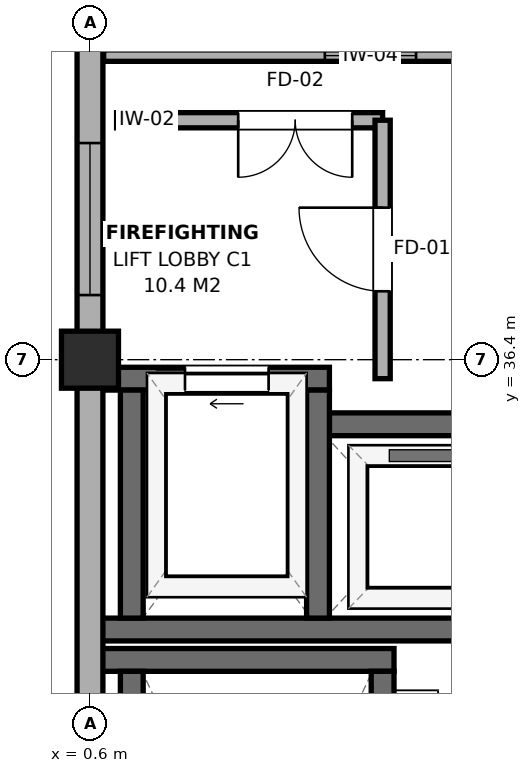
"""IFC4 building model, lengths in metres.
Left out: names, types, materials, properties, quantities, classifications, styles, units other than length and angle.
Written with IfcOpenShell. Run it as: python <this file> out.ifc"""

import sys

from ifc_helpers import new_model, si_unit, direction, frame, frame_2d, origin, origin_2d, place, context, subcontext, project, spatial, rectangle, extrude, element, fill, save


model = new_model("IFC4")
c1 = context("Model", 3, precision=1e-05, world=origin(), true_north=direction((0.0, 1.0)))
c2 = subcontext(c1, "Body", "Model", "MODEL_VIEW")
j1 = project(units=[si_unit("LENGTHUNIT", "METRE"), si_unit("PLANEANGLEUNIT", "RADIAN")], contexts=[c1])
p1 = place(None, origin())
s1 = spatial("IfcSite", under=j1, at=p1, CompositionType="ELEMENT")
p2 = place(p1, origin())
s2 = spatial("IfcBuilding", under=s1, at=p2, CompositionType="ELEMENT")
p3 = place(p2, origin())
s3 = spatial("IfcBuildingStorey", under=s2, at=p3, CompositionType="ELEMENT", Elevation=0.0)
p4 = place(p3, frame((0.6, 36.4, 0.0), z_axis=(0.0, 0.0, 1.0), x_axis=(1.0, 0.0, 0.0)))
e1 = element("IfcColumn", 1, at=p4, inside=s3, PredefinedType="COLUMN", context=c2, shape_type="SweptSolid", body=[
    extrude(rectangle(XDim=0.75, YDim=0.75, at=origin_2d()), origin(), (0.0, 0.0, 1.0), 4.8),
])
p5 = place(p3, frame((0.75, 32.45, 0.0), z_axis=(0.0, 0.0, 1.0), x_axis=(1.0, 0.0, 0.0)))
e2 = element("IfcWall", 2, at=p5, inside=s3, PredefinedType="SHEAR", context=c2, shape_type="SweptSolid", body=[
    extrude(rectangle(XDim=3.85, YDim=0.3, at=frame_2d((1.925, 0.0))), origin(), (0.0, 0.0, 1.0), 4.56),
])
p6 = place(p3, frame((1.15, 25.9, 0.0), z_axis=(0.0, 0.0, 1.0), x_axis=(0.0, 1.0, 0.0)))
e3 = element("IfcWall", 3, at=p6, inside=s3, PredefinedType="SHEAR", context=c2, shape_type="SweptSolid", body=[
    extrude(rectangle(XDim=6.4, YDim=0.3, at=frame_2d((3.2, 0.0))), origin(), (0.0, 0.0, 1.0), 4.56),
])
p7 = place(p3, frame((4.45, 25.9, 0.0), z_axis=(0.0, 0.0, 1.0), x_axis=(0.0, 1.0, 0.0)))
e4 = element("IfcWall", 4, at=p7, inside=s3, PredefinedType="SHEAR", context=c2, shape_type="SweptSolid", body=[
    extrude(rectangle(XDim=6.4, YDim=0.3, at=frame_2d((3.2, 0.0))), origin(), (0.0, 0.0, 1.0), 4.56),
])
p8 = place(p7, frame((0.17, 0.0, 0.0)))
e5 = element("IfcOpeningElement", 5, at=p8, cuts=e4, PredefinedType="OPENING", context=c2, shape_type="SweptSolid", body=[
    extrude(rectangle(XDim=1.1, YDim=2.15, at=frame_2d((0.55, 1.075))), frame((0.0, 0.165, 0.0), z_axis=(0.0, -1.0, 0.0), x_axis=(1.0, 0.0, 0.0)), (0.0, 0.0, 1.0), 0.33),
])
p9 = place(p3, frame((0.75, 32.85, 0.0), z_axis=(0.0, 0.0, 1.0), x_axis=(1.0, 0.0, 0.0)))
e6 = element("IfcWall", 6, at=p9, inside=s3, PredefinedType="SHEAR", context=c2, shape_type="SweptSolid", body=[
    extrude(rectangle(XDim=5.45, YDim=0.3, at=frame_2d((2.725, 0.0))), origin(), (0.0, 0.0, 1.0), 4.56),
])
p10 = place(p3, frame((0.75, 36.15, 0.0), z_axis=(0.0, 0.0, 1.0), x_axis=(1.0, 0.0, 0.0)))
e7 = element("IfcWall", 7, at=p10, inside=s3, PredefinedType="SHEAR", context=c2, shape_type="SweptSolid", body=[
    extrude(rectangle(XDim=3.0, YDim=0.3, at=frame_2d((1.5, 0.0))), origin(), (0.0, 0.0, 1.0), 4.56),
])
p11 = place(p10, frame((1.1, 0.0, 0.0)))
e8 = element("IfcOpeningElement", 8, at=p11, cuts=e7, PredefinedType="OPENING", context=c2, shape_type="SweptSolid", body=[
    extrude(rectangle(XDim=1.1, YDim=2.15, at=frame_2d((0.55, 1.075))), frame((0.0, 0.165, 0.0), z_axis=(0.0, -1.0, 0.0), x_axis=(1.0, 0.0, 0.0)), (0.0, 0.0, 1.0), 0.33),
])
p12 = place(p3, frame((3.75, 35.55, 0.0), z_axis=(0.0, 0.0, 1.0), x_axis=(1.0, 0.0, 0.0)))
e9 = element("IfcWall", 9, at=p12, inside=s3, PredefinedType="SHEAR", context=c2, shape_type="SweptSolid", body=[
    extrude(rectangle(XDim=2.45, YDim=0.3, at=frame_2d((1.225, 0.0))), origin(), (0.0, 0.0, 1.0), 4.56),
])
for number, where, z_axis, x_axis in (
    (10, (1.15, 33.0, 0.0), (0.0, 0.0, 1.0), (0.0, 1.0, 0.0)),
    (11, (3.6, 33.0, 0.0), (0.0, 0.0, 1.0), (0.0, 1.0, 0.0)),
):
    element("IfcWall", number, at=place(p3, frame(where, z_axis=z_axis, x_axis=x_axis)), inside=s3, PredefinedType="SHEAR", context=c2, shape_type="SweptSolid", body=[
        extrude(rectangle(XDim=3.0, YDim=0.3, at=frame_2d((1.5, 0.0))), origin(), (0.0, 0.0, 1.0), 4.56),
    ])
p13 = place(p3, frame((0.6, 30.8, 0.0), z_axis=(0.0, 0.0, 1.0), x_axis=(0.0, 1.0, 0.0)))
e12 = element("IfcWall", 12, at=p13, inside=s3, PredefinedType="SOLIDWALL", context=c2, shape_type="SweptSolid", body=[
    extrude(rectangle(XDim=5.6, YDim=0.34, at=frame_2d((2.8, 0.0))), origin(), (0.0, 0.0, 1.0), 4.055),
])
p14 = place(p3, frame((0.6, 36.4, 0.0), z_axis=(0.0, 0.0, 1.0), x_axis=(0.0, 1.0, 0.0)))
e13 = element("IfcWall", 13, at=p14, inside=s3, PredefinedType="SOLIDWALL", context=c2, shape_type="SweptSolid", body=[
    extrude(rectangle(XDim=5.6, YDim=0.34, at=frame_2d((2.8, 0.0))), origin(), (0.0, 0.0, 1.0), 4.105),
])
p15 = place(p14, frame((0.85, 0.0, 0.9)))
e14 = element("IfcOpeningElement", 14, at=p15, cuts=e13, PredefinedType="OPENING", context=c2, shape_type="SweptSolid", body=[
    extrude(rectangle(XDim=2.0, YDim=1.8, at=frame_2d((1.0, 0.9))), frame((0.0, 0.185, 0.0), z_axis=(0.0, -1.0, 0.0), x_axis=(1.0, 0.0, 0.0)), (0.0, 0.0, 1.0), 0.37),
])
p16 = place(p3, frame((0.95, 39.55, 0.0), z_axis=(0.0, 0.0, 1.0), x_axis=(1.0, 0.0, 0.0)))
e15 = element("IfcWall", 15, at=p16, inside=s3, PredefinedType="PARTITIONING", context=c2, shape_type="SweptSolid", body=[
    extrude(rectangle(XDim=3.5, YDim=0.2, at=frame_2d((1.75, 0.0))), origin(), (0.0, 0.0, 1.0), 4.555),
])
p17 = place(p16, frame((1.6, 0.0, 0.0)))
e16 = element("IfcOpeningElement", 16, at=p17, cuts=e15, PredefinedType="OPENING", context=c2, shape_type="SweptSolid", body=[
    extrude(rectangle(XDim=1.5, YDim=2.15, at=frame_2d((0.75, 1.075))), frame((0.0, 0.115, 0.0), z_axis=(0.0, -1.0, 0.0), x_axis=(1.0, 0.0, 0.0)), (0.0, 0.0, 1.0), 0.23),
])
p18 = place(p3, frame((4.45, 36.15, 0.0), z_axis=(0.0, 0.0, 1.0), x_axis=(0.0, 1.0, 0.0)))
e17 = element("IfcWall", 17, at=p18, inside=s3, PredefinedType="PARTITIONING", context=c2, shape_type="SweptSolid", body=[
    extrude(rectangle(XDim=3.4, YDim=0.2, at=frame_2d((1.7, 0.0))), origin(), (0.0, 0.0, 1.0), 4.205),
])
p19 = place(p18, frame((1.15, 0.0, 0.0)))
e18 = element("IfcOpeningElement", 18, at=p19, cuts=e17, PredefinedType="OPENING", context=c2, shape_type="SweptSolid", body=[
    extrude(rectangle(XDim=1.1, YDim=2.15, at=frame_2d((0.55, 1.075))), frame((0.0, 0.115, 0.0), z_axis=(0.0, -1.0, 0.0), x_axis=(1.0, 0.0, 0.0)), (0.0, 0.0, 1.0), 0.23),
])
p20 = place(p3, frame((0.78, 40.4, 0.0), z_axis=(0.0, 0.0, 1.0), x_axis=(1.0, 0.0, 0.0)))
e19 = element("IfcWall", 19, at=p20, inside=s3, PredefinedType="PARTITIONING", context=c2, shape_type="SweptSolid", body=[
    extrude(rectangle(XDim=7.02, YDim=0.15, at=frame_2d((3.51, 0.0))), origin(), (0.0, 0.0, 1.0), 4.105),
])
p21 = place(p20, frame((2.91, 0.0, 0.95)))
e20 = element("IfcOpeningElement", 20, at=p21, cuts=e19, PredefinedType="OPENING", context=c2, shape_type="SweptSolid", body=[
    extrude(rectangle(XDim=1.2, YDim=1.5, at=frame_2d((0.6, 0.75))), frame((0.0, 0.09, 0.0), z_axis=(0.0, -1.0, 0.0), x_axis=(1.0, 0.0, 0.0)), (0.0, 0.0, 1.0), 0.18),
])
p22 = place(p15, origin())
e21 = element("IfcWindow", 21, at=p22, inside=s3, PartitioningType="SINGLE_PANEL", PredefinedType="WINDOW", context=c2, shape_type="SweptSolid", body=[
    extrude(rectangle(XDim=2.0, YDim=1.8, at=frame_2d((1.0, 0.9))), frame((0.0, 0.03, 0.0), z_axis=(0.0, -1.0, 0.0), x_axis=(1.0, 0.0, 0.0)), (0.0, 0.0, 1.0), 0.06),
])
fill(e14, e21)
p23 = place(p11, origin())
e22 = element("IfcDoor", 22, at=p23, inside=s3, OperationType="SLIDING_TO_LEFT", PredefinedType="DOOR", context=c2, shape_type="SweptSolid", body=[
    extrude(rectangle(XDim=1.1, YDim=2.15, at=frame_2d((0.55, 1.075))), frame((0.0, 0.025, 0.0), z_axis=(0.0, -1.0, 0.0), x_axis=(1.0, 0.0, 0.0)), (0.0, 0.0, 1.0), 0.05),
])
fill(e8, e22)
p24 = place(p17, frame((1.5, 0.0, 0.0), z_axis=(0.0, 0.0, 1.0), x_axis=(-1.0, 0.0, 0.0)))
e23 = element("IfcDoor", 23, at=p24, inside=s3, OperationType="DOUBLE_DOOR_SINGLE_SWING", PredefinedType="DOOR", context=c2, shape_type="SweptSolid", body=[
    extrude(rectangle(XDim=1.5, YDim=2.15, at=frame_2d((0.75, 1.075))), frame((0.0, 0.025, 0.0), z_axis=(0.0, -1.0, 0.0), x_axis=(1.0, 0.0, 0.0)), (0.0, 0.0, 1.0), 0.05),
])
fill(e16, e23)
p25 = place(p19, origin())
e24 = element("IfcDoor", 24, at=p25, inside=s3, OperationType="SINGLE_SWING_RIGHT", PredefinedType="DOOR", context=c2, shape_type="SweptSolid", body=[
    extrude(rectangle(XDim=1.1, YDim=2.15, at=frame_2d((0.55, 1.075))), frame((0.0, 0.025, 0.0), z_axis=(0.0, -1.0, 0.0), x_axis=(1.0, 0.0, 0.0)), (0.0, 0.0, 1.0), 0.05),
])
fill(e18, e24)
p26 = place(p21, origin())
e25 = element("IfcWindow", 25, at=p26, inside=s3, PartitioningType="SINGLE_PANEL", PredefinedType="WINDOW", context=c2, shape_type="SweptSolid", body=[
    extrude(rectangle(XDim=1.2, YDim=1.5, at=frame_2d((0.6, 0.75))), frame((0.0, 0.03, 0.0), z_axis=(0.0, -1.0, 0.0), x_axis=(1.0, 0.0, 0.0)), (0.0, 0.0, 1.0), 0.06),
])
fill(e20, e25)
save(model, sys.argv[1])
